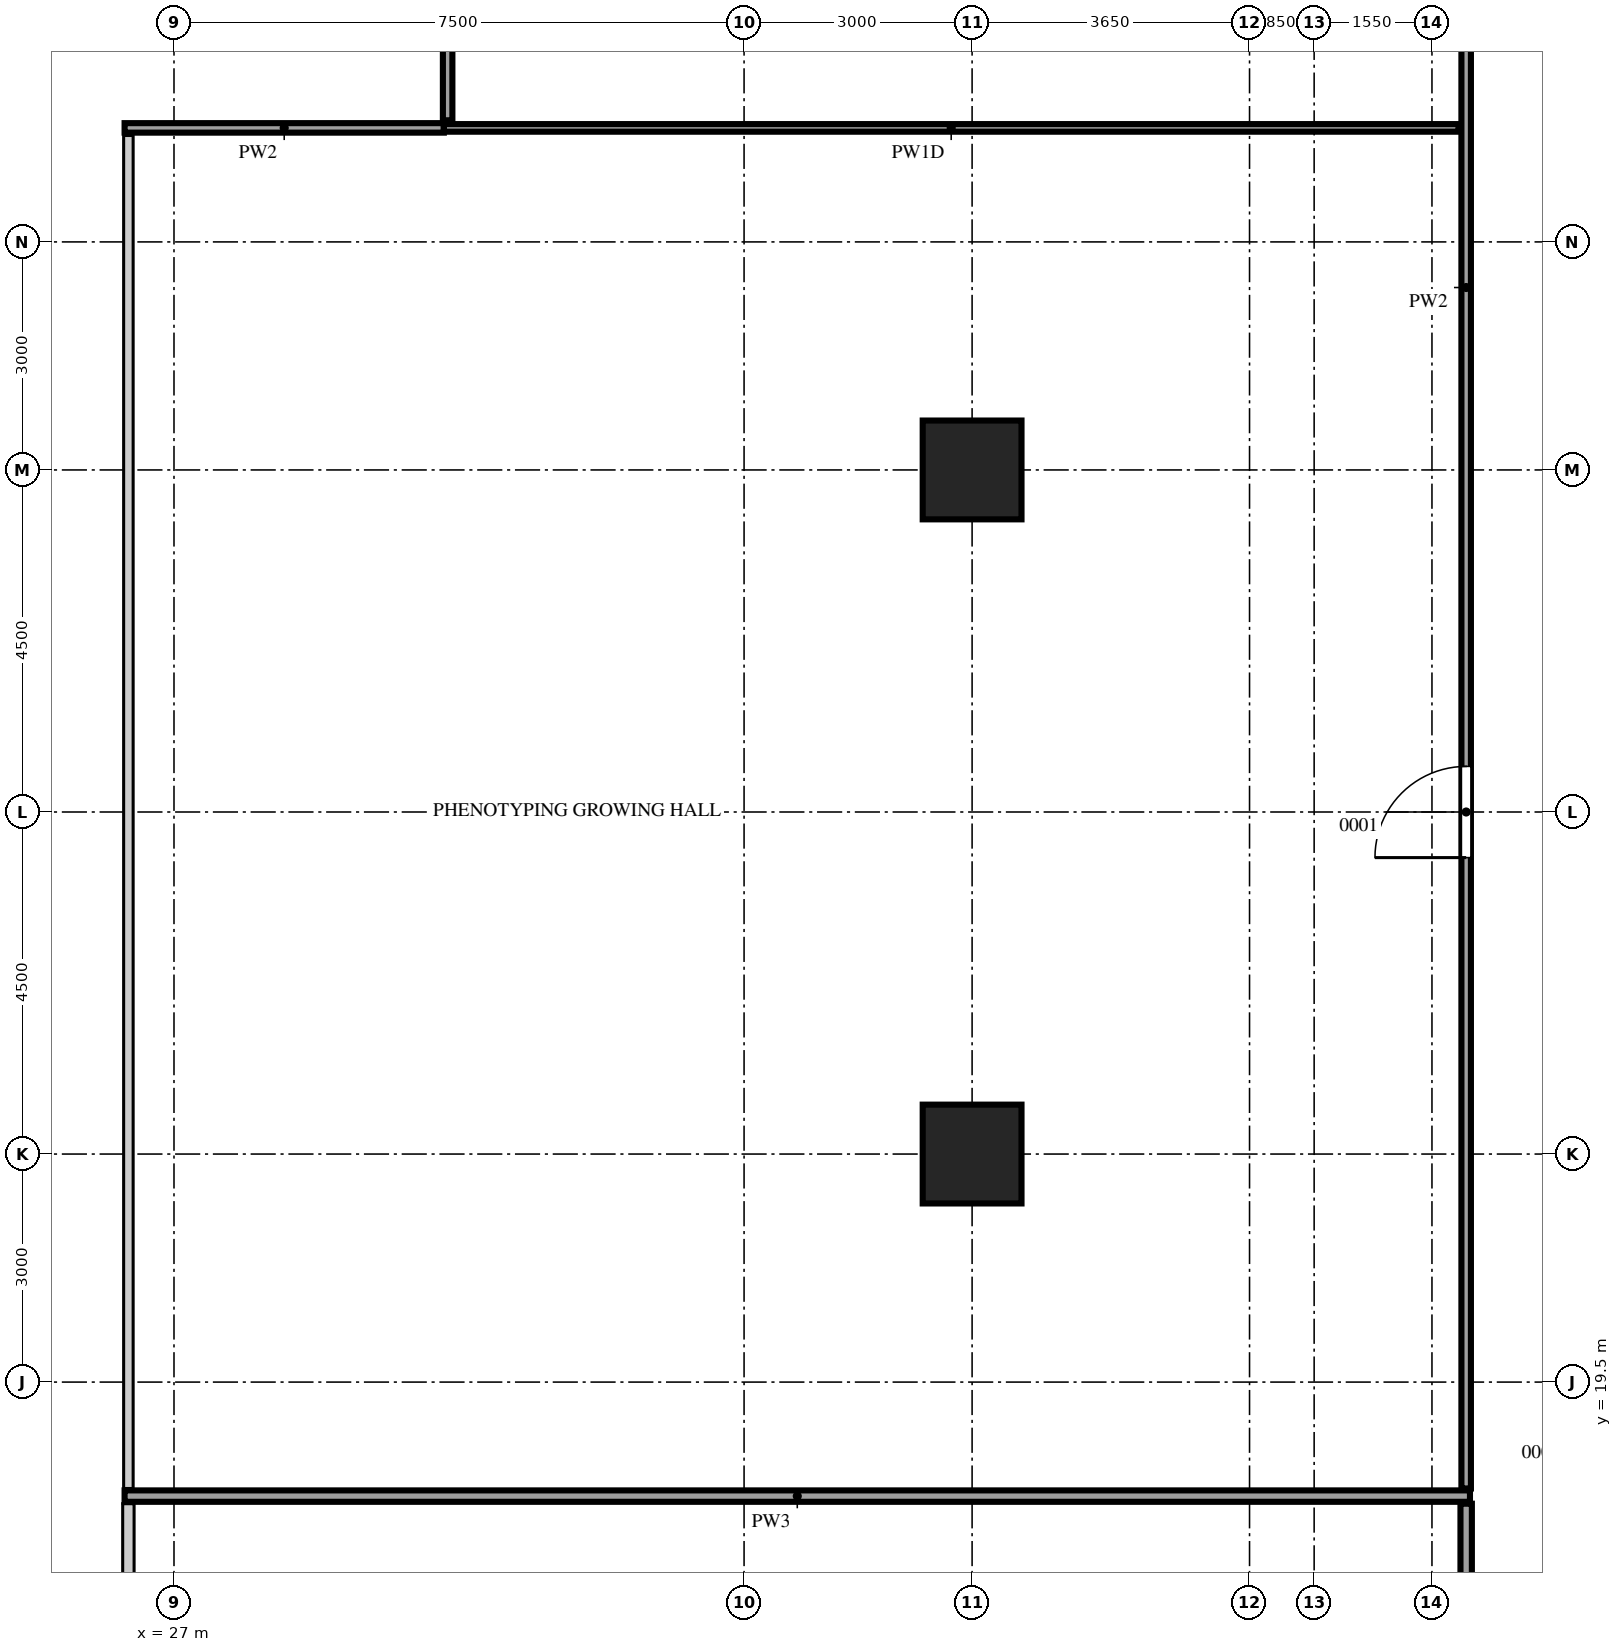
"""IFC4 building model, lengths in metres.
Left out: names, types, materials, properties, quantities, classifications, styles, units other than length and angle.
Written with IfcOpenShell. Run it as: python <this file> out.ifc"""

import sys

from ifc_helpers import new_model, si_unit, direction, frame, frame_2d, origin, origin_2d, place, context, subcontext, project, spatial, rectangle, extrude, source, transform, mapped, element, fill, save


model = new_model("IFC4")
c1 = context("Model", 3, precision=1e-05, world=origin(), true_north=direction((0.0, 1.0)))
c2 = subcontext(c1, "Body", "Model", "MODEL_VIEW")
j1 = project(units=[si_unit("LENGTHUNIT", "METRE"), si_unit("PLANEANGLEUNIT", "RADIAN")], contexts=[c1])
p1 = place(None, origin())
s1 = spatial("IfcSite", under=j1, at=p1, CompositionType="ELEMENT")
p2 = place(p1, origin())
s2 = spatial("IfcBuilding", under=s1, at=p2, CompositionType="ELEMENT")
p3 = place(p2, frame((0.0, 0.0, 136.7)))
s3 = spatial("IfcBuildingStorey", under=s2, at=p3, CompositionType="ELEMENT", Elevation=136.7)
m1 = source(origin(), c2, "Body", "SweptSolid", [
    extrude(rectangle(XDim=1.3, YDim=1.3, at=origin_2d()), origin(), (0.0, 0.0, 1.0), 4.1),
])
for number, where, z_axis, x_axis in (
    (1, (37.5, 22.5, 0.0), (0.0, 0.0, 1.0), (1.0, 0.0, 0.0)),
    (2, (37.5, 31.5, 0.0), (0.0, 0.0, 1.0), (1.0, 0.0, 0.0)),
):
    element("IfcColumn", number, at=place(p3, frame(where, z_axis=z_axis, x_axis=x_axis)), inside=s3, PredefinedType="COLUMN", context=c2, shape_type="MappedRepresentation", body=[
        mapped(m1, transform((0.0, 0.0, 0.0))),
    ])
m2 = source(origin(), c2, "Body", "SweptSolid", [
    extrude(rectangle(XDim=5.2, YDim=0.15, at=frame_2d((2.6, 0.0))), origin(), (0.0, 0.0, 1.0), 4.2),
])
p4 = place(p3, frame((26.4, 12.7, 0.0), z_axis=(0.0, 0.0, 1.0), x_axis=(0.0, 1.0, 0.0)))
e3 = element("IfcWall", 3, at=p4, inside=s3, PredefinedType="PARTITIONING", context=c2, shape_type="MappedRepresentation", body=[
    mapped(m2, transform((0.0, 0.0, 0.0))),
])
m3 = source(origin(), c2, "Body", "SweptSolid", [
    extrude(rectangle(XDim=0.9, YDim=2.1, at=frame_2d((0.45, 1.05))), frame((0.0, 0.085, 0.0), z_axis=(0.0, -1.0, 0.0), x_axis=(1.0, 0.0, 0.0)), (0.0, 0.0, 1.0), 0.17),
])
p5 = place(p4, frame((2.15, 0.0, 0.0)))
e4 = element("IfcOpeningElement", 4, at=p5, cuts=e3, PredefinedType="OPENING", context=c2, shape_type="MappedRepresentation", body=[
    mapped(m3, transform((0.0, 0.0, 0.0))),
])
p6 = place(p3, frame((44.0, 12.7, 0.0), z_axis=(0.0, 0.0, 1.0), x_axis=(0.0, 1.0, 0.0)))
e5 = element("IfcWall", 5, at=p6, inside=s3, PredefinedType="PARTITIONING", context=c2, shape_type="MappedRepresentation", body=[
    mapped(m2, transform((0.0, 0.0, 0.0))),
])
m4 = source(origin(), c2, "Body", "SweptSolid", [
    extrude(rectangle(XDim=17.7, YDim=0.15, at=frame_2d((8.85, 0.0))), origin(), (0.0, 0.0, 1.0), 4.2),
])
p7 = place(p3, frame((26.35, 18.0, 0.0), z_axis=(0.0, 0.0, 1.0), x_axis=(1.0, 0.0, 0.0)))
e6 = element("IfcWall", 6, at=p7, inside=s3, PredefinedType="PARTITIONING", context=c2, shape_type="MappedRepresentation", body=[
    mapped(m4, transform((0.0, 0.0, 0.0))),
])
m5 = source(origin(), c2, "Body", "SweptSolid", [
    extrude(rectangle(XDim=17.8, YDim=0.125, at=frame_2d((8.9, 0.0))), origin(), (0.0, 0.0, 1.0), 4.2),
])
p8 = place(p3, frame((26.4, 18.1, 0.0), z_axis=(0.0, 0.0, 1.0), x_axis=(0.0, 1.0, 0.0)))
e7 = element("IfcWall", 7, at=p8, inside=s3, PredefinedType="PARTITIONING", context=c2, shape_type="MappedRepresentation", body=[
    mapped(m5, transform((0.0, 0.0, 0.0))),
])
m6 = source(origin(), c2, "Body", "SweptSolid", [
    extrude(rectangle(XDim=27.45, YDim=0.125, at=frame_2d((13.725, 0.0))), origin(), (0.0, 0.0, 1.0), 4.2),
])
p9 = place(p3, frame((44.0, 18.1, 0.0), z_axis=(0.0, 0.0, 1.0), x_axis=(0.0, 1.0, 0.0)))
e8 = element("IfcWall", 8, at=p9, inside=s3, PredefinedType="PARTITIONING", context=c2, shape_type="MappedRepresentation", body=[
    mapped(m6, transform((0.0, 0.0, 0.0))),
])
m7 = source(origin(), c2, "Body", "SweptSolid", [
    extrude(rectangle(XDim=1.2, YDim=2.1, at=frame_2d((0.6, 1.05))), frame((0.0, 0.073, 0.0), z_axis=(0.0, -1.0, 0.0), x_axis=(1.0, 0.0, 0.0)), (0.0, 0.0, 1.0), 0.145),
])
p10 = place(p9, frame((8.3, 0.0, 0.0)))
e9 = element("IfcOpeningElement", 9, at=p10, cuts=e8, PredefinedType="OPENING", context=c2, shape_type="MappedRepresentation", body=[
    mapped(m7, transform((0.0, 0.0, 0.0))),
])
p11 = place(p9, frame((22.1, 0.0, 0.0)))
e10 = element("IfcOpeningElement", 10, at=p11, cuts=e8, PredefinedType="OPENING", context=c2, shape_type="MappedRepresentation", body=[
    mapped(m7, transform((0.0, 0.0, 0.0))),
])
m8 = source(origin(), c2, "Body", "SweptSolid", [
    extrude(rectangle(XDim=4.2, YDim=0.125, at=frame_2d((2.1, 0.0))), origin(), (0.0, 0.0, 1.0), 4.2),
])
p12 = place(p3, frame((26.35, 36.0, 0.0), z_axis=(0.0, 0.0, 1.0), x_axis=(1.0, 0.0, 0.0)))
e11 = element("IfcWall", 11, at=p12, inside=s3, PredefinedType="PARTITIONING", context=c2, shape_type="MappedRepresentation", body=[
    mapped(m8, transform((0.0, 0.0, 0.0))),
])
m9 = source(origin(), c2, "Body", "SweptSolid", [
    extrude(rectangle(XDim=13.35, YDim=0.1, at=frame_2d((6.675, 0.0))), origin(), (0.0, 0.0, 1.0), 4.2),
])
p13 = place(p3, frame((30.55, 36.0, 0.0), z_axis=(0.0, 0.0, 1.0), x_axis=(1.0, 0.0, 0.0)))
e12 = element("IfcWall", 12, at=p13, inside=s3, PredefinedType="PARTITIONING", context=c2, shape_type="MappedRepresentation", body=[
    mapped(m9, transform((0.0, 0.0, 0.0))),
])
m10 = source(origin(), c2, "Body", "SweptSolid", [
    extrude(rectangle(XDim=9.45, YDim=0.125, at=frame_2d((4.725, 0.0))), origin(), (0.0, 0.0, 1.0), 4.2),
])
p14 = place(p3, frame((30.6, 36.1, 0.0), z_axis=(0.0, 0.0, 1.0), x_axis=(0.0, 1.0, 0.0)))
e13 = element("IfcWall", 13, at=p14, inside=s3, PredefinedType="PARTITIONING", context=c2, shape_type="MappedRepresentation", body=[
    mapped(m10, transform((0.0, 0.0, 0.0))),
])
m11 = source(origin(), c2, "Body", "SweptSolid", [
    extrude(rectangle(XDim=1.2, YDim=2.1, at=frame_2d((0.6, 1.05))), frame((0.0, 0.025, 0.0), z_axis=(0.0, -1.0, 0.0), x_axis=(1.0, 0.0, 0.0)), (0.0, 0.0, 1.0), 0.05),
])
p15 = place(p10, origin())
e14 = element("IfcDoor", 14, at=p15, inside=s3, OperationType="SINGLE_SWING_RIGHT", PredefinedType="DOOR", context=c2, shape_type="MappedRepresentation", body=[
    mapped(m11, transform((0.0, 0.0, 0.0))),
])
fill(e9, e14)
save(model, sys.argv[1])
